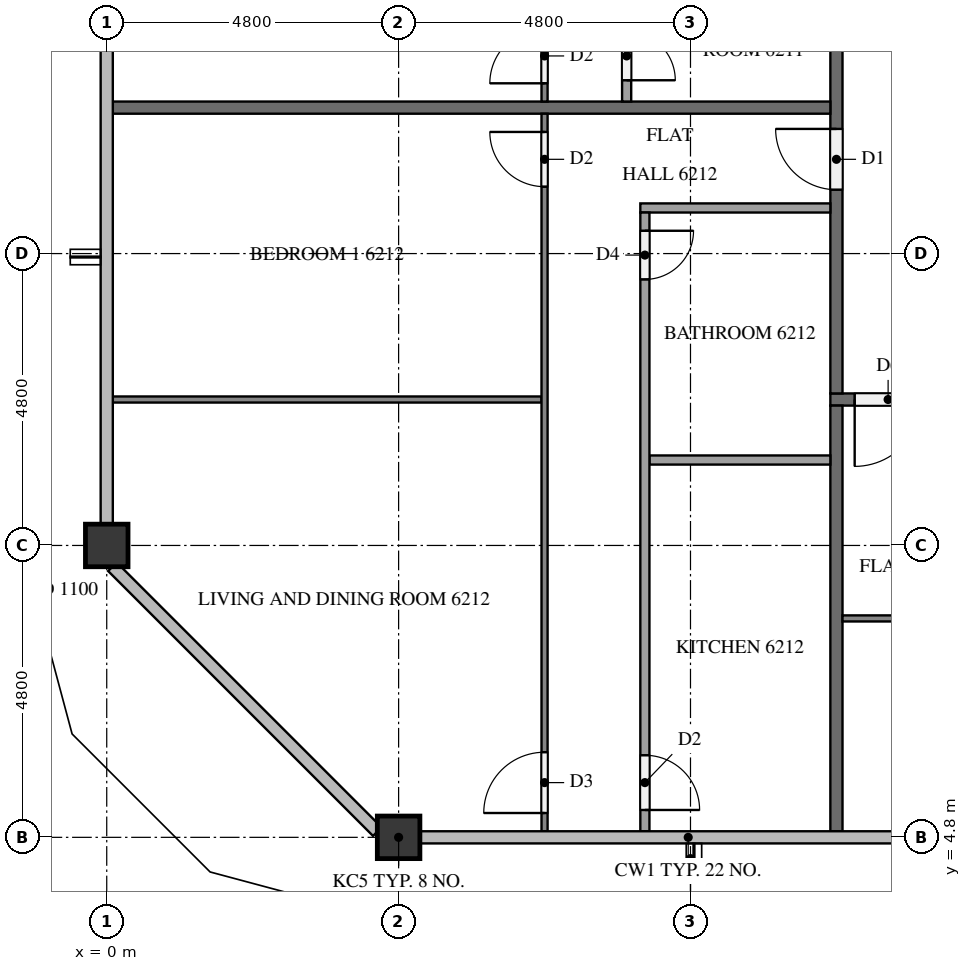
"""IFC4 building model, lengths in metres.
Left out: names, types, materials, properties, quantities, classifications, styles, units other than length and angle.
Written with IfcOpenShell. Run it as: python <this file> out.ifc"""

import sys

from ifc_helpers import new_model, si_unit, direction, frame, frame_2d, origin, origin_2d, place, context, subcontext, project, spatial, rectangle, extrude, element, fill, save


model = new_model("IFC4")
c1 = context("Model", 3, precision=1e-05, world=origin(), true_north=direction((0.0, 1.0)))
c2 = subcontext(c1, "Body", "Model", "MODEL_VIEW")
j1 = project(units=[si_unit("LENGTHUNIT", "METRE"), si_unit("PLANEANGLEUNIT", "RADIAN")], contexts=[c1])
p1 = place(None, origin())
s1 = spatial("IfcSite", under=j1, at=p1, CompositionType="ELEMENT")
p2 = place(p1, origin())
s2 = spatial("IfcBuilding", under=s1, at=p2, CompositionType="ELEMENT")
p3 = place(p2, frame((0.0, 0.0, 238.7)))
s3 = spatial("IfcBuildingStorey", under=s2, at=p3, CompositionType="ELEMENT", Elevation=238.7)
for number, where, z_axis, x_axis in (
    (1, (4.8, 4.8, 0.0), (0.0, 0.0, 1.0), (1.0, 0.0, 0.0)),
    (2, (0.0, 9.6, 0.0), (0.0, 0.0, 1.0), (1.0, 0.0, 0.0)),
):
    element("IfcColumn", number, at=place(p3, frame(where, z_axis=z_axis, x_axis=x_axis)), inside=s3, PredefinedType="COLUMN", context=c2, shape_type="SweptSolid", body=[
        extrude(rectangle(XDim=0.7, YDim=0.7, at=origin_2d()), origin(), (0.0, 0.0, 1.0), 3.2),
    ])
p4 = place(p3, frame((50.5, 12.0, 0.0), z_axis=(0.0, 0.0, 1.0), x_axis=(-1.0, 0.0, 0.0)))
e3 = element("IfcWall", 3, at=p4, inside=s3, PredefinedType="PARTITIONING", context=c2, shape_type="SweptSolid", body=[
    extrude(rectangle(XDim=38.6, YDim=0.2, at=frame_2d((19.3, 0.0))), origin(), (0.0, 0.0, 1.0), 3.2),
])
p5 = place(p4, frame((37.1, 0.0, 0.0)))
e4 = element("IfcOpeningElement", 4, at=p5, cuts=e3, PredefinedType="OPENING", context=c2, shape_type="SweptSolid", body=[
    extrude(rectangle(XDim=1.1, YDim=2.1, at=frame_2d((0.55, 1.05))), frame((0.0, 0.11, 0.0), z_axis=(0.0, -1.0, 0.0), x_axis=(1.0, 0.0, 0.0)), (0.0, 0.0, 1.0), 0.22),
])
p6 = place(p4, frame((17.95, 0.0, 0.0)))
e5 = element("IfcOpeningElement", 5, at=p6, cuts=e3, PredefinedType="OPENING", context=c2, shape_type="SweptSolid", body=[
    extrude(rectangle(XDim=1.0, YDim=2.1, at=frame_2d((0.5, 1.05))), frame((0.0, 0.11, 0.0), z_axis=(0.0, -1.0, 0.0), x_axis=(1.0, 0.0, 0.0)), (0.0, 0.0, 1.0), 0.22),
])
p7 = place(p4, frame((8.35, 0.0, 0.0)))
e6 = element("IfcOpeningElement", 6, at=p7, cuts=e3, PredefinedType="OPENING", context=c2, shape_type="SweptSolid", body=[
    extrude(rectangle(XDim=1.0, YDim=2.1, at=frame_2d((0.5, 1.05))), frame((0.0, 0.11, 0.0), z_axis=(0.0, -1.0, 0.0), x_axis=(1.0, 0.0, 0.0)), (0.0, 0.0, 1.0), 0.22),
])
p8 = place(p3, frame((12.0, 12.1, 0.0), z_axis=(0.0, 0.0, 1.0), x_axis=(0.0, 1.0, 0.0)))
e7 = element("IfcWall", 7, at=p8, inside=s3, PredefinedType="PARTITIONING", context=c2, shape_type="SweptSolid", body=[
    extrude(rectangle(XDim=28.6, YDim=0.2, at=frame_2d((14.3, 0.0))), origin(), (0.0, 0.0, 1.0), 3.2),
])
p9 = place(p8, frame((27.35, 0.0, 0.0)))
e8 = element("IfcOpeningElement", 8, at=p9, cuts=e7, PredefinedType="OPENING", context=c2, shape_type="SweptSolid", body=[
    extrude(rectangle(XDim=1.0, YDim=2.1, at=frame_2d((0.5, 1.05))), frame((0.0, 0.11, 0.0), z_axis=(0.0, -1.0, 0.0), x_axis=(1.0, 0.0, 0.0)), (0.0, 0.0, 1.0), 0.22),
])
p10 = place(p8, frame((17.75, 0.0, 0.0)))
e9 = element("IfcOpeningElement", 9, at=p10, cuts=e7, PredefinedType="OPENING", context=c2, shape_type="SweptSolid", body=[
    extrude(rectangle(XDim=1.0, YDim=2.1, at=frame_2d((0.5, 1.05))), frame((0.0, 0.11, 0.0), z_axis=(0.0, -1.0, 0.0), x_axis=(1.0, 0.0, 0.0)), (0.0, 0.0, 1.0), 0.22),
])
p11 = place(p8, frame((3.35, 0.0, 0.0)))
e10 = element("IfcOpeningElement", 10, at=p11, cuts=e7, PredefinedType="OPENING", context=c2, shape_type="SweptSolid", body=[
    extrude(rectangle(XDim=1.0, YDim=2.1, at=frame_2d((0.5, 1.05))), frame((0.0, 0.11, 0.0), z_axis=(0.0, -1.0, 0.0), x_axis=(1.0, 0.0, 0.0)), (0.0, 0.0, 1.0), 0.22),
])
p12 = place(p3, frame((12.0, 4.9, 0.0), z_axis=(0.0, 0.0, 1.0), x_axis=(0.0, 1.0, 0.0)))
e11 = element("IfcWall", 11, at=p12, inside=s3, PredefinedType="PARTITIONING", context=c2, shape_type="SweptSolid", body=[
    extrude(rectangle(XDim=7.0, YDim=0.2, at=frame_2d((3.5, 0.0))), origin(), (0.0, 0.0, 1.0), 3.2),
])
p13 = place(p3, frame((0.1, 16.8, 0.0), z_axis=(0.0, 0.0, 1.0), x_axis=(1.0, 0.0, 0.0)))
e12 = element("IfcWall", 12, at=p13, inside=s3, PredefinedType="PARTITIONING", context=c2, shape_type="SweptSolid", body=[
    extrude(rectangle(XDim=11.8, YDim=0.2, at=frame_2d((5.9, 0.0))), origin(), (0.0, 0.0, 1.0), 3.2),
])
p14 = place(p3, frame((31.1, 8.4, 0.0), z_axis=(0.0, 0.0, 1.0), x_axis=(-1.0, 0.0, 0.0)))
e13 = element("IfcWall", 13, at=p14, inside=s3, PredefinedType="PARTITIONING", context=c2, shape_type="SweptSolid", body=[
    extrude(rectangle(XDim=19.0, YDim=0.1, at=frame_2d((9.5, 0.0))), origin(), (0.0, 0.0, 1.0), 3.2),
])
p15 = place(p14, frame((14.65, 0.0, 0.0)))
e14 = element("IfcOpeningElement", 14, at=p15, cuts=e13, PredefinedType="OPENING", context=c2, shape_type="SweptSolid", body=[
    extrude(rectangle(XDim=0.9, YDim=2.1, at=frame_2d((0.45, 1.05))), frame((0.0, 0.06, 0.0), z_axis=(0.0, -1.0, 0.0), x_axis=(1.0, 0.0, 0.0)), (0.0, 0.0, 1.0), 0.12),
])
p16 = place(p14, frame((12.95, 0.0, 0.0)))
e15 = element("IfcOpeningElement", 15, at=p16, cuts=e13, PredefinedType="OPENING", context=c2, shape_type="SweptSolid", body=[
    extrude(rectangle(XDim=1.0, YDim=2.1, at=frame_2d((0.5, 1.05))), frame((0.0, 0.06, 0.0), z_axis=(0.0, -1.0, 0.0), x_axis=(1.0, 0.0, 0.0)), (0.0, 0.0, 1.0), 0.12),
])
p17 = place(p14, frame((5.05, 0.0, 0.0)))
e16 = element("IfcOpeningElement", 16, at=p17, cuts=e13, PredefinedType="OPENING", context=c2, shape_type="SweptSolid", body=[
    extrude(rectangle(XDim=0.9, YDim=2.1, at=frame_2d((0.45, 1.05))), frame((0.0, 0.06, 0.0), z_axis=(0.0, -1.0, 0.0), x_axis=(1.0, 0.0, 0.0)), (0.0, 0.0, 1.0), 0.12),
])
p18 = place(p14, frame((3.45, 0.0, 0.0)))
e17 = element("IfcOpeningElement", 17, at=p18, cuts=e13, PredefinedType="OPENING", context=c2, shape_type="SweptSolid", body=[
    extrude(rectangle(XDim=0.9, YDim=2.1, at=frame_2d((0.45, 1.05))), frame((0.0, 0.06, 0.0), z_axis=(0.0, -1.0, 0.0), x_axis=(1.0, 0.0, 0.0)), (0.0, 0.0, 1.0), 0.12),
])
p19 = place(p3, frame((7.2, 16.9, 0.0), z_axis=(0.0, 0.0, 1.0), x_axis=(0.0, 1.0, 0.0)))
e18 = element("IfcWall", 18, at=p19, inside=s3, PredefinedType="PARTITIONING", context=c2, shape_type="SweptSolid", body=[
    extrude(rectangle(XDim=14.2, YDim=0.1, at=frame_2d((7.1, 0.0))), origin(), (0.0, 0.0, 1.0), 3.2),
])
p20 = place(p19, frame((9.85, 0.0, 0.0)))
e19 = element("IfcOpeningElement", 19, at=p20, cuts=e18, PredefinedType="OPENING", context=c2, shape_type="SweptSolid", body=[
    extrude(rectangle(XDim=1.0, YDim=2.1, at=frame_2d((0.5, 1.05))), frame((0.0, 0.06, 0.0), z_axis=(0.0, -1.0, 0.0), x_axis=(1.0, 0.0, 0.0)), (0.0, 0.0, 1.0), 0.12),
])
p21 = place(p19, frame((8.25, 0.0, 0.0)))
e20 = element("IfcOpeningElement", 20, at=p21, cuts=e18, PredefinedType="OPENING", context=c2, shape_type="SweptSolid", body=[
    extrude(rectangle(XDim=0.9, YDim=2.1, at=frame_2d((0.45, 1.05))), frame((0.0, 0.06, 0.0), z_axis=(0.0, -1.0, 0.0), x_axis=(1.0, 0.0, 0.0)), (0.0, 0.0, 1.0), 0.12),
])
p22 = place(p19, frame((0.3, 0.0, 0.0)))
e21 = element("IfcOpeningElement", 21, at=p22, cuts=e18, PredefinedType="OPENING", context=c2, shape_type="SweptSolid", body=[
    extrude(rectangle(XDim=0.9, YDim=2.1, at=frame_2d((0.45, 1.05))), frame((0.0, 0.06, 0.0), z_axis=(0.0, -1.0, 0.0), x_axis=(1.0, 0.0, 0.0)), (0.0, 0.0, 1.0), 0.12),
])
p23 = place(p3, frame((8.55, 29.475, 0.0), z_axis=(0.0, 0.0, 1.0), x_axis=(0.0, -1.0, 0.0)))
e22 = element("IfcWall", 22, at=p23, inside=s3, PredefinedType="PARTITIONING", context=c2, shape_type="SweptSolid", body=[
    extrude(rectangle(XDim=12.575, YDim=0.15, at=frame_2d((6.288, 0.0))), origin(), (0.0, 0.0, 1.0), 3.2),
])
p24 = place(p23, frame((4.579, 0.0, 0.0)))
e23 = element("IfcOpeningElement", 23, at=p24, cuts=e22, PredefinedType="OPENING", context=c2, shape_type="SweptSolid", body=[
    extrude(rectangle(XDim=0.9, YDim=2.1, at=frame_2d((0.45, 1.05))), frame((0.0, 0.085, 0.0), z_axis=(0.0, -1.0, 0.0), x_axis=(1.0, 0.0, 0.0)), (0.0, 0.0, 1.0), 0.17),
])
p25 = place(p23, frame((6.129, 0.0, 0.0)))
e24 = element("IfcOpeningElement", 24, at=p25, cuts=e22, PredefinedType="OPENING", context=c2, shape_type="SweptSolid", body=[
    extrude(rectangle(XDim=0.9, YDim=2.1, at=frame_2d((0.45, 1.05))), frame((0.0, 0.085, 0.0), z_axis=(0.0, -1.0, 0.0), x_axis=(1.0, 0.0, 0.0)), (0.0, 0.0, 1.0), 0.17),
])
p26 = place(p23, frame((11.425, 0.0, 0.0)))
e25 = element("IfcOpeningElement", 25, at=p26, cuts=e22, PredefinedType="OPENING", context=c2, shape_type="SweptSolid", body=[
    extrude(rectangle(XDim=0.8, YDim=2.1, at=frame_2d((0.4, 1.05))), frame((0.0, 0.085, 0.0), z_axis=(0.0, -1.0, 0.0), x_axis=(1.0, 0.0, 0.0)), (0.0, 0.0, 1.0), 0.17),
])
p27 = place(p3, frame((7.15, 12.0, 0.0), z_axis=(0.0, 0.0, 1.0), x_axis=(-1.0, 0.0, 0.0)))
e26 = element("IfcWall", 26, at=p27, inside=s3, PredefinedType="PARTITIONING", context=c2, shape_type="SweptSolid", body=[
    extrude(rectangle(XDim=7.05, YDim=0.1, at=frame_2d((3.525, 0.0))), origin(), (0.0, 0.0, 1.0), 3.2),
])
p28 = place(p3, frame((7.2, 4.9, 0.0), z_axis=(0.0, 0.0, 1.0), x_axis=(0.0, 1.0, 0.0)))
e27 = element("IfcWall", 27, at=p28, inside=s3, PredefinedType="PARTITIONING", context=c2, shape_type="SweptSolid", body=[
    extrude(rectangle(XDim=11.8, YDim=0.1, at=frame_2d((5.9, 0.0))), origin(), (0.0, 0.0, 1.0), 3.2),
])
p29 = place(p28, frame((10.6, 0.0, 0.0)))
e28 = element("IfcOpeningElement", 28, at=p29, cuts=e27, PredefinedType="OPENING", context=c2, shape_type="SweptSolid", body=[
    extrude(rectangle(XDim=0.9, YDim=2.1, at=frame_2d((0.45, 1.05))), frame((0.0, 0.06, 0.0), z_axis=(0.0, -1.0, 0.0), x_axis=(1.0, 0.0, 0.0)), (0.0, 0.0, 1.0), 0.12),
])
p30 = place(p28, frame((0.3, 0.0, 0.0)))
e29 = element("IfcOpeningElement", 29, at=p30, cuts=e27, PredefinedType="OPENING", context=c2, shape_type="SweptSolid", body=[
    extrude(rectangle(XDim=1.0, YDim=2.1, at=frame_2d((0.5, 1.05))), frame((0.0, 0.06, 0.0), z_axis=(0.0, -1.0, 0.0), x_axis=(1.0, 0.0, 0.0)), (0.0, 0.0, 1.0), 0.12),
])
p31 = place(p3, frame((11.9, 11.005, 0.0), z_axis=(0.0, 0.0, 1.0), x_axis=(-1.0, 0.0, 0.0)))
e30 = element("IfcWall", 30, at=p31, inside=s3, PredefinedType="PARTITIONING", context=c2, shape_type="SweptSolid", body=[
    extrude(rectangle(XDim=2.975, YDim=0.15, at=frame_2d((1.487, 0.0))), origin(), (0.0, 0.0, 1.0), 3.2),
])
p32 = place(p3, frame((11.9, 15.15, 0.0), z_axis=(0.0, 0.0, 1.0), x_axis=(-1.0, 0.0, 0.0)))
e31 = element("IfcWall", 31, at=p32, inside=s3, PredefinedType="PARTITIONING", context=c2, shape_type="SweptSolid", body=[
    extrude(rectangle(XDim=3.125, YDim=0.15, at=frame_2d((1.562, 0.0))), origin(), (0.0, 0.0, 1.0), 3.2),
])
p33 = place(p3, frame((8.85, 15.075, 0.0), z_axis=(0.0, 0.0, 1.0), x_axis=(0.0, -1.0, 0.0)))
e32 = element("IfcWall", 32, at=p33, inside=s3, PredefinedType="PARTITIONING", context=c2, shape_type="SweptSolid", body=[
    extrude(rectangle(XDim=10.175, YDim=0.15, at=frame_2d((5.087, 0.0))), origin(), (0.0, 0.0, 1.0), 3.2),
])
p34 = place(p33, frame((0.3, 0.0, 0.0)))
e33 = element("IfcOpeningElement", 33, at=p34, cuts=e32, PredefinedType="OPENING", context=c2, shape_type="SweptSolid", body=[
    extrude(rectangle(XDim=0.8, YDim=2.1, at=frame_2d((0.4, 1.05))), frame((0.0, 0.085, 0.0), z_axis=(0.0, -1.0, 0.0), x_axis=(1.0, 0.0, 0.0)), (0.0, 0.0, 1.0), 0.17),
])
p35 = place(p33, frame((8.925, 0.0, 0.0)))
e34 = element("IfcOpeningElement", 34, at=p35, cuts=e32, PredefinedType="OPENING", context=c2, shape_type="SweptSolid", body=[
    extrude(rectangle(XDim=0.9, YDim=2.1, at=frame_2d((0.45, 1.05))), frame((0.0, 0.085, 0.0), z_axis=(0.0, -1.0, 0.0), x_axis=(1.0, 0.0, 0.0)), (0.0, 0.0, 1.0), 0.17),
])
p36 = place(p5, origin())
e35 = element("IfcDoor", 35, at=p36, inside=s3, OperationType="SINGLE_SWING_RIGHT", PredefinedType="DOOR", context=c2, shape_type="SweptSolid", body=[
    extrude(rectangle(XDim=1.1, YDim=2.1, at=frame_2d((0.55, 1.05))), frame((0.0, 0.025, 0.0), z_axis=(0.0, -1.0, 0.0), x_axis=(1.0, 0.0, 0.0)), (0.0, 0.0, 1.0), 0.05),
])
fill(e4, e35)
p37 = place(p11, origin())
e36 = element("IfcDoor", 36, at=p37, inside=s3, OperationType="SINGLE_SWING_RIGHT", PredefinedType="DOOR", context=c2, shape_type="SweptSolid", body=[
    extrude(rectangle(XDim=1.0, YDim=2.1, at=frame_2d((0.5, 1.05))), frame((0.0, 0.025, 0.0), z_axis=(0.0, -1.0, 0.0), x_axis=(1.0, 0.0, 0.0)), (0.0, 0.0, 1.0), 0.05),
])
fill(e10, e36)
p38 = place(p22, origin())
e37 = element("IfcDoor", 37, at=p38, inside=s3, OperationType="SINGLE_SWING_LEFT", PredefinedType="DOOR", context=c2, shape_type="SweptSolid", body=[
    extrude(rectangle(XDim=0.9, YDim=2.1, at=frame_2d((0.45, 1.05))), frame((0.0, 0.025, 0.0), z_axis=(0.0, -1.0, 0.0), x_axis=(1.0, 0.0, 0.0)), (0.0, 0.0, 1.0), 0.05),
])
fill(e21, e37)
p39 = place(p26, origin())
e38 = element("IfcDoor", 38, at=p39, inside=s3, OperationType="SINGLE_SWING_RIGHT", PredefinedType="DOOR", context=c2, shape_type="SweptSolid", body=[
    extrude(rectangle(XDim=0.8, YDim=2.1, at=frame_2d((0.4, 1.05))), frame((0.0, 0.025, 0.0), z_axis=(0.0, -1.0, 0.0), x_axis=(1.0, 0.0, 0.0)), (0.0, 0.0, 1.0), 0.05),
])
fill(e25, e38)
p40 = place(p29, origin())
e39 = element("IfcDoor", 39, at=p40, inside=s3, OperationType="SINGLE_SWING_RIGHT", PredefinedType="DOOR", context=c2, shape_type="SweptSolid", body=[
    extrude(rectangle(XDim=0.9, YDim=2.1, at=frame_2d((0.45, 1.05))), frame((0.0, 0.025, 0.0), z_axis=(0.0, -1.0, 0.0), x_axis=(1.0, 0.0, 0.0)), (0.0, 0.0, 1.0), 0.05),
])
fill(e28, e39)
p41 = place(p30, origin())
e40 = element("IfcDoor", 40, at=p41, inside=s3, OperationType="SINGLE_SWING_LEFT", PredefinedType="DOOR", context=c2, shape_type="SweptSolid", body=[
    extrude(rectangle(XDim=1.0, YDim=2.1, at=frame_2d((0.5, 1.05))), frame((0.0, 0.025, 0.0), z_axis=(0.0, -1.0, 0.0), x_axis=(1.0, 0.0, 0.0)), (0.0, 0.0, 1.0), 0.05),
])
fill(e29, e40)
p42 = place(p34, origin())
e41 = element("IfcDoor", 41, at=p42, inside=s3, OperationType="SINGLE_SWING_LEFT", PredefinedType="DOOR", context=c2, shape_type="SweptSolid", body=[
    extrude(rectangle(XDim=0.8, YDim=2.1, at=frame_2d((0.4, 1.05))), frame((0.0, 0.025, 0.0), z_axis=(0.0, -1.0, 0.0), x_axis=(1.0, 0.0, 0.0)), (0.0, 0.0, 1.0), 0.05),
])
fill(e33, e41)
p43 = place(p35, origin())
e42 = element("IfcDoor", 42, at=p43, inside=s3, OperationType="SINGLE_SWING_RIGHT", PredefinedType="DOOR", context=c2, shape_type="SweptSolid", body=[
    extrude(rectangle(XDim=0.9, YDim=2.1, at=frame_2d((0.45, 1.05))), frame((0.0, 0.025, 0.0), z_axis=(0.0, -1.0, 0.0), x_axis=(1.0, 0.0, 0.0)), (0.0, 0.0, 1.0), 0.05),
])
fill(e34, e42)
save(model, sys.argv[1])
